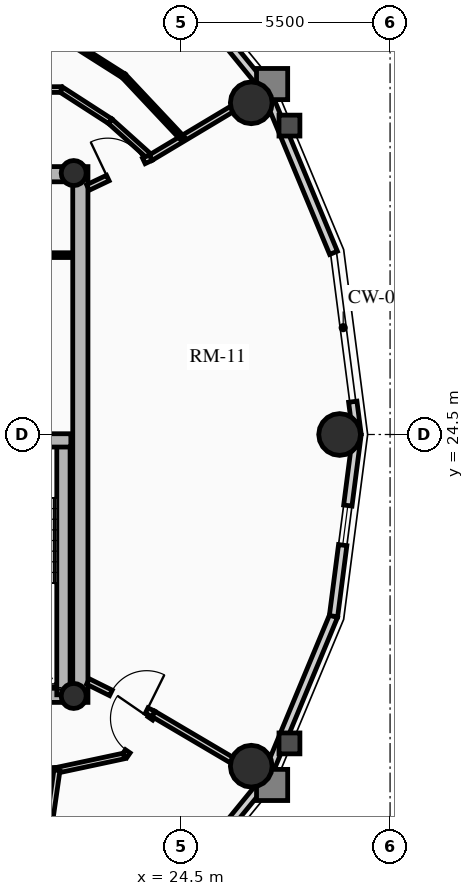
"""IFC4 building model, lengths in metres.
Left out: names, types, materials, properties, quantities, classifications, styles, units other than length and angle.
Written with IfcOpenShell. Run it as: python <this file> out.ifc"""

import sys

from ifc_helpers import new_model, si_unit, direction, frame, frame_2d, origin, origin_2d, place, context, subcontext, project, spatial, rectangle, circle, hollow_circle, extrude, source, transform, mapped, element, fill, save


model = new_model("IFC4")
c1 = context("Model", 3, precision=1e-05, world=origin(), true_north=direction((0.0, 1.0)))
c2 = subcontext(c1, "Body", "Model", "MODEL_VIEW")
j1 = project(units=[si_unit("LENGTHUNIT", "METRE"), si_unit("PLANEANGLEUNIT", "RADIAN")], contexts=[c1])
p1 = place(None, origin())
s1 = spatial("IfcSite", under=j1, at=p1, CompositionType="ELEMENT")
p2 = place(p1, origin())
s2 = spatial("IfcBuilding", under=s1, at=p2, CompositionType="ELEMENT")
p3 = place(p2, frame((0.0, 0.0, 219.94)))
s3 = spatial("IfcBuildingStorey", under=s2, at=p3, CompositionType="ELEMENT", Elevation=219.94)
p4 = place(p3, frame((21.85, 17.45, 0.0), z_axis=(0.0, 0.0, 1.0), x_axis=(0.0, 1.0, 0.0)))
e1 = element("IfcWall", 1, at=p4, inside=s3, PredefinedType="SHEAR", context=c2, shape_type="SweptSolid", body=[
    extrude(rectangle(XDim=14.1, YDim=0.4, at=frame_2d((7.05, 0.0))), origin(), (0.0, 0.0, 1.0), 2.91),
])
p5 = place(p3, frame((11.15, 17.65, 0.0), z_axis=(0.0, 0.0, 1.0), x_axis=(1.0, 0.0, 0.0)))
e2 = element("IfcWall", 2, at=p5, inside=s3, PredefinedType="SHEAR", context=c2, shape_type="SweptSolid", body=[
    extrude(rectangle(XDim=10.7, YDim=0.4, at=frame_2d((5.35, 0.0))), origin(), (0.0, 0.0, 1.0), 2.91),
])
m1 = source(origin(), c2, "Body", "SweptSolid", [
    extrude(rectangle(XDim=1.5, YDim=2.02, at=frame_2d((0.75, 1.01))), frame((0.0, 0.21, 0.0), z_axis=(0.0, -1.0, 0.0), x_axis=(1.0, 0.0, 0.0)), (0.0, 0.0, 1.0), 0.42),
])
p6 = place(p5, frame((5.45, 0.0, 0.0)))
e3 = element("IfcOpeningElement", 3, at=p6, cuts=e2, PredefinedType="OPENING", context=c2, shape_type="MappedRepresentation", body=[
    mapped(m1, transform((0.0, 0.0, 0.0), x_axis=(1.0, 0.0, 0.0), y_axis=(0.0, 1.0, 0.0), z_axis=(0.0, 0.0, 1.0), scale=1.0)),
])
p7 = place(p3, frame((11.15, 31.35, 0.0), z_axis=(0.0, 0.0, 1.0), x_axis=(1.0, 0.0, 0.0)))
e4 = element("IfcWall", 4, at=p7, inside=s3, PredefinedType="SHEAR", context=c2, shape_type="SweptSolid", body=[
    extrude(rectangle(XDim=10.7, YDim=0.4, at=frame_2d((5.35, 0.0))), origin(), (0.0, 0.0, 1.0), 2.91),
])
p8 = place(p7, frame((4.6, 0.0, 0.0)))
e5 = element("IfcOpeningElement", 5, at=p8, cuts=e4, PredefinedType="OPENING", context=c2, shape_type="MappedRepresentation", body=[
    mapped(m1, transform((0.0, 0.0, 0.0), x_axis=(1.0, 0.0, 0.0), y_axis=(0.0, 1.0, 0.0), z_axis=(0.0, 0.0, 1.0), scale=1.0)),
])
p9 = place(p3, frame((21.405, 17.65, 0.0), z_axis=(0.0, 0.0, 1.0), x_axis=(0.0, 1.0, 0.0)))
e6 = element("IfcWall", 6, at=p9, inside=s3, PredefinedType="SHEAR", context=c2, shape_type="SweptSolid", body=[
    extrude(rectangle(XDim=6.695, YDim=0.35, at=frame_2d((3.348, 0.0))), origin(), (0.0, 0.0, 1.0), 2.91),
])
p10 = place(p3, frame((18.315, 24.345, 0.0), z_axis=(0.0, 0.0, 1.0), x_axis=(1.0, 0.0, 0.0)))
e7 = element("IfcWall", 7, at=p10, inside=s3, PredefinedType="SHEAR", context=c2, shape_type="SweptSolid", body=[
    extrude(rectangle(XDim=3.285, YDim=0.35, at=frame_2d((1.643, 0.0))), origin(), (0.0, 0.0, 1.0), 2.91),
])
for number, where, z_axis, x_axis in (
    (8, (21.675, 17.62, 0.0), (0.0, 0.0, 1.0), (1.0, 0.0, 0.0)),
    (9, (21.675, 31.38, 0.0), (0.0, 0.0, 1.0), (1.0, 0.0, 0.0)),
):
    element("IfcColumn", number, at=place(p3, frame(where, z_axis=z_axis, x_axis=x_axis)), inside=s3, PredefinedType="COLUMN", context=c2, shape_type="SweptSolid", body=[
        extrude(hollow_circle(Radius=0.33, WallThickness=0.025, at=origin_2d()), origin(), (0.0, 0.0, 1.0), 2.91),
    ])
for number, where, z_axis, x_axis in (
    (10, (28.672, 24.5, 0.0), (0.0, 0.0, 1.0), (1.0, 0.0, 0.0)),
    (11, (26.347, 33.229, 0.0), (0.0, 0.0, 1.0), (1.0, 0.0, 0.0)),
    (12, (26.347, 15.771, 0.0), (0.0, 0.0, 1.0), (1.0, 0.0, 0.0)),
):
    element("IfcColumn", number, at=place(p3, frame(where, z_axis=z_axis, x_axis=x_axis)), inside=s3, PredefinedType="USERDEFINED", context=c2, shape_type="SweptSolid", body=[
        extrude(circle(Radius=0.55, at=origin_2d()), origin(), (0.0, 0.0, 1.0), 2.91),
    ])
p11 = place(p3, frame((29.018, 25.363, 0.0), z_axis=(0.0, 0.0, 1.0), x_axis=(0.128247365719, -0.991742211054, 0.0)))
e13 = element("IfcWall", 13, at=p11, inside=s3, PredefinedType="SOLIDWALL", context=c2, shape_type="SweptSolid", body=[
    extrude(rectangle(XDim=0.87, YDim=0.22, at=frame_2d((0.435, 0.0))), origin(), (0.0, 0.0, 1.0), 2.322),
])
p12 = place(p3, frame((26.718, 33.593, 0.0), z_axis=(0.0, 0.0, 1.0), x_axis=(0.384036305194, -0.923317993052, 0.0)))
e14 = element("IfcWall", 14, at=p12, inside=s3, PredefinedType="SOLIDWALL", context=c2, shape_type="SweptSolid", body=[
    extrude(rectangle(XDim=4.671, YDim=0.22, at=frame_2d((2.335, 0.0))), origin(), (0.0, 0.0, 1.0), 2.322),
])
p13 = place(p3, frame((23.924, 37.015, 0.0), z_axis=(0.0, 0.0, 1.0), x_axis=(0.632467166636, -0.774587169483, 0.0)))
e15 = element("IfcWall", 15, at=p13, inside=s3, PredefinedType="SOLIDWALL", context=c2, shape_type="SweptSolid", body=[
    extrude(rectangle(XDim=4.418, YDim=0.22, at=frame_2d((2.209, 0.0))), origin(), (0.0, 0.0, 1.0), 2.322),
])
m2 = source(origin(), c2, "Body", "SweptSolid", [
    extrude(rectangle(XDim=1.05, YDim=1.3, at=frame_2d((0.525, 0.65))), frame((0.0, 0.12, 0.0), z_axis=(0.0, -1.0, 0.0), x_axis=(1.0, 0.0, 0.0)), (0.0, 0.0, 1.0), 0.24),
])
p14 = place(p13, frame((1.684, 0.0, 0.65)))
e16 = element("IfcOpeningElement", 16, at=p14, cuts=e15, PredefinedType="OPENING", context=c2, shape_type="MappedRepresentation", body=[
    mapped(m2, transform((0.0, 0.0, 0.0), x_axis=(1.0, 0.0, 0.0), y_axis=(0.0, 1.0, 0.0), z_axis=(0.0, 0.0, 1.0), scale=1.0)),
])
p15 = place(p3, frame((26.718, 15.407, 0.0), z_axis=(0.0, 0.0, 1.0), x_axis=(-0.632467166636, -0.774587169483, 0.0)))
e17 = element("IfcWall", 17, at=p15, inside=s3, PredefinedType="SOLIDWALL", context=c2, shape_type="SweptSolid", body=[
    extrude(rectangle(XDim=4.418, YDim=0.22, at=frame_2d((2.209, 0.0))), origin(), (0.0, 0.0, 1.0), 2.322),
])
p16 = place(p15, frame((1.684, 0.0, 0.65)))
e18 = element("IfcOpeningElement", 18, at=p16, cuts=e17, PredefinedType="OPENING", context=c2, shape_type="MappedRepresentation", body=[
    mapped(m2, transform((0.0, 0.0, 0.0), x_axis=(1.0, 0.0, 0.0), y_axis=(0.0, 1.0, 0.0), z_axis=(0.0, 0.0, 1.0), scale=1.0)),
])
p17 = place(p3, frame((28.512, 19.719, 0.0), z_axis=(0.0, 0.0, 1.0), x_axis=(-0.384036305194, -0.923317993052, 0.0)))
e19 = element("IfcWall", 19, at=p17, inside=s3, PredefinedType="SOLIDWALL", context=c2, shape_type="SweptSolid", body=[
    extrude(rectangle(XDim=4.671, YDim=0.22, at=frame_2d((2.335, 0.0))), origin(), (0.0, 0.0, 1.0), 2.322),
])
p18 = place(p3, frame((29.13, 24.5, 0.0), z_axis=(0.0, 0.0, 1.0), x_axis=(-0.128241318541, -0.991742993027, 0.0)))
e20 = element("IfcWall", 20, at=p18, inside=s3, PredefinedType="SOLIDWALL", context=c2, shape_type="SweptSolid", body=[
    extrude(rectangle(XDim=4.82, YDim=0.22, at=frame_2d((2.41, 0.0))), origin(), (0.0, 0.0, 1.0), 2.322),
])
p19 = place(p18, frame((1.885, 0.0, 0.65)))
e21 = element("IfcOpeningElement", 21, at=p19, cuts=e20, PredefinedType="OPENING", context=c2, shape_type="MappedRepresentation", body=[
    mapped(m2, transform((0.0, 0.0, 0.0), x_axis=(1.0, 0.0, 0.0), y_axis=(0.0, 1.0, 0.0), z_axis=(0.0, 0.0, 1.0), scale=1.0)),
])
p20 = place(p3, frame((18.38, 29.22, 0.0), z_axis=(0.0, 0.0, 1.0), x_axis=(1.0, 0.0, 0.0)))
e22 = element("IfcWall", 22, at=p20, inside=s3, PredefinedType="PARTITIONING", context=c2, shape_type="SweptSolid", body=[
    extrude(rectangle(XDim=3.22, YDim=0.125, at=frame_2d((1.61, 0.0))), origin(), (0.0, 0.0, 1.0), 2.222),
])
p21 = place(p3, frame((23.701, 31.786, 0.0), z_axis=(0.0, 0.0, 1.0), x_axis=(-0.743742806382, 0.668465883913, 0.0)))
e23 = element("IfcWall", 23, at=p21, inside=s3, PredefinedType="PARTITIONING", context=c2, shape_type="SweptSolid", body=[
    extrude(rectangle(XDim=1.434, YDim=0.15, at=frame_2d((0.717, 0.0))), origin(), (0.0, 0.0, 1.0), 2.322),
])
p22 = place(p3, frame((22.635, 32.744, 0.0), z_axis=(0.0, 0.0, 1.0), x_axis=(-0.840119270642, 0.542401706391, 0.0)))
e24 = element("IfcWall", 24, at=p22, inside=s3, PredefinedType="PARTITIONING", context=c2, shape_type="SweptSolid", body=[
    extrude(rectangle(XDim=1.538, YDim=0.15, at=frame_2d((0.769, 0.0))), origin(), (0.0, 0.0, 1.0), 2.255),
])
p23 = place(p3, frame((21.344, 33.578, 0.0), z_axis=(0.0, 0.0, 1.0), x_axis=(-0.999984243152, -0.005613684, 0.0)))
e25 = element("IfcWall", 25, at=p23, inside=s3, PredefinedType="PARTITIONING", context=c2, shape_type="SweptSolid", body=[
    extrude(rectangle(XDim=3.262, YDim=0.15, at=frame_2d((1.631, 0.0))), origin(), (0.0, 0.0, 1.0), 2.322),
])
m3 = source(origin(), c2, "Body", "SweptSolid", [
    extrude(rectangle(XDim=1.05, YDim=2.015, at=frame_2d((0.525, 1.007))), frame((0.0, 0.085, 0.0), z_axis=(0.0, -1.0, 0.0), x_axis=(1.0, 0.0, 0.0)), (0.0, 0.0, 1.0), 0.17),
])
p24 = place(p23, frame((1.599, 0.0, 0.0)))
e26 = element("IfcOpeningElement", 26, at=p24, cuts=e25, PredefinedType="OPENING", context=c2, shape_type="MappedRepresentation", body=[
    mapped(m3, transform((0.0, 0.0, 0.0), x_axis=(1.0, 0.0, 0.0), y_axis=(0.0, 1.0, 0.0), z_axis=(0.0, 0.0, 1.0), scale=1.0)),
])
p25 = place(p3, frame((14.845, 15.441, 0.0), z_axis=(0.0, 0.0, 1.0), x_axis=(0.99938794868, 0.034981824334, 0.0)))
e27 = element("IfcWall", 27, at=p25, inside=s3, PredefinedType="PARTITIONING", context=c2, shape_type="SweptSolid", body=[
    extrude(rectangle(XDim=6.393, YDim=0.15, at=frame_2d((3.196, 0.0))), origin(), (0.0, 0.0, 1.0), 2.255),
])
p26 = place(p3, frame((21.234, 15.664, 0.0), z_axis=(0.0, 0.0, 1.0), x_axis=(0.977931581182, 0.208925399431, 0.0)))
e28 = element("IfcWall", 28, at=p26, inside=s3, PredefinedType="PARTITIONING", context=c2, shape_type="SweptSolid", body=[
    extrude(rectangle(XDim=1.823, YDim=0.15, at=frame_2d((0.912, 0.0))), origin(), (0.0, 0.0, 1.0), 2.255),
])
p27 = place(p3, frame((23.017, 16.045, 0.0), z_axis=(0.0, 0.0, 1.0), x_axis=(0.566660656138, 0.823951273308, 0.0)))
e29 = element("IfcWall", 29, at=p27, inside=s3, PredefinedType="PARTITIONING", context=c2, shape_type="SweptSolid", body=[
    extrude(rectangle(XDim=1.336, YDim=0.15, at=frame_2d((0.668, 0.0))), origin(), (0.0, 0.0, 1.0), 2.322),
])
p28 = place(p27, frame((0.143, 0.0, 0.0)))
e30 = element("IfcOpeningElement", 30, at=p28, cuts=e29, PredefinedType="OPENING", context=c2, shape_type="MappedRepresentation", body=[
    mapped(m3, transform((0.0, 0.0, 0.0), x_axis=(1.0, 0.0, 0.0), y_axis=(0.0, 1.0, 0.0), z_axis=(0.0, 0.0, 1.0), scale=1.0)),
])
p29 = place(p3, frame((23.701, 31.786, 0.0), z_axis=(0.0, 0.0, 1.0), x_axis=(0.858059206709, 0.513550774298, 0.0)))
e31 = element("IfcWall", 31, at=p29, inside=s3, PredefinedType="PARTITIONING", context=c2, shape_type="SweptSolid", body=[
    extrude(rectangle(XDim=3.497, YDim=0.16, at=frame_2d((1.748, 0.0))), origin(), (0.0, 0.0, 1.0), 2.322),
])
p30 = place(p3, frame((21.234, 15.664, 0.0), z_axis=(0.0, 0.0, 1.0), x_axis=(-0.141467563045, -0.989942891588, 0.0)))
e32 = element("IfcWall", 32, at=p30, inside=s3, PredefinedType="PARTITIONING", context=c2, shape_type="SweptSolid", body=[
    extrude(rectangle(XDim=5.918, YDim=0.16, at=frame_2d((2.959, 0.0))), origin(), (0.0, 0.0, 1.0), 2.322),
])
p31 = place(p3, frame((23.774, 17.146, 0.0), z_axis=(0.0, 0.0, 1.0), x_axis=(0.861296601099, -0.508102514198, 0.0)))
e33 = element("IfcWall", 33, at=p31, inside=s3, PredefinedType="PARTITIONING", context=c2, shape_type="SweptSolid", body=[
    extrude(rectangle(XDim=3.399, YDim=0.16, at=frame_2d((1.7, 0.0))), origin(), (0.0, 0.0, 1.0), 2.322),
])
p32 = place(p3, frame((22.05, 31.0, 0.0), z_axis=(0.0, 0.0, 1.0), x_axis=(0.903013459407, 0.429612257891, 0.0)))
e34 = element("IfcWall", 34, at=p32, inside=s3, PredefinedType="PARTITIONING", context=c2, shape_type="SweptSolid", body=[
    extrude(rectangle(XDim=1.829, YDim=0.16, at=frame_2d((0.914, 0.0))), origin(), (0.0, 0.0, 1.0), 2.255),
])
m4 = source(origin(), c2, "Body", "SweptSolid", [
    extrude(rectangle(XDim=1.05, YDim=2.015, at=frame_2d((0.525, 1.007))), frame((0.0, 0.09, 0.0), z_axis=(0.0, -1.0, 0.0), x_axis=(1.0, 0.0, 0.0)), (0.0, 0.0, 1.0), 0.18),
])
p33 = place(p32, frame((0.579, 0.0, 0.0)))
e35 = element("IfcOpeningElement", 35, at=p33, cuts=e34, PredefinedType="OPENING", context=c2, shape_type="MappedRepresentation", body=[
    mapped(m4, transform((0.0, 0.0, 0.0), x_axis=(1.0, 0.0, 0.0), y_axis=(0.0, 1.0, 0.0), z_axis=(0.0, 0.0, 1.0), scale=1.0)),
])
p34 = place(p3, frame((22.05, 18.0, 0.0), z_axis=(0.0, 0.0, 1.0), x_axis=(0.896045848613, -0.443961526692, 0.0)))
e36 = element("IfcWall", 36, at=p34, inside=s3, PredefinedType="PARTITIONING", context=c2, shape_type="SweptSolid", body=[
    extrude(rectangle(XDim=1.924, YDim=0.16, at=frame_2d((0.962, 0.0))), origin(), (0.0, 0.0, 1.0), 2.255),
])
p35 = place(p34, frame((0.674, 0.0, 0.0)))
e37 = element("IfcOpeningElement", 37, at=p35, cuts=e36, PredefinedType="OPENING", context=c2, shape_type="MappedRepresentation", body=[
    mapped(m4, transform((0.0, 0.0, 0.0), x_axis=(1.0, 0.0, 0.0), y_axis=(0.0, 1.0, 0.0), z_axis=(0.0, 0.0, 1.0), scale=1.0)),
])
p36 = place(p3, frame((24.542, 32.288, 0.0), z_axis=(0.0, 0.0, 1.0), x_axis=(-0.68501091047, 0.72853280814, 0.0)))
e38 = element("IfcWall", 38, at=p36, inside=s3, PredefinedType="PARTITIONING", context=c2, shape_type="SweptSolid", body=[
    extrude(rectangle(XDim=2.261, YDim=0.125, at=frame_2d((1.13, 0.0))), origin(), (0.0, 0.0, 1.0), 2.322),
])
p37 = place(p3, frame((22.993, 33.935, 0.0), z_axis=(0.0, 0.0, 1.0), x_axis=(-0.844312558894, 0.535851008112, 0.0)))
e39 = element("IfcWall", 39, at=p37, inside=s3, PredefinedType="PARTITIONING", context=c2, shape_type="SweptSolid", body=[
    extrude(rectangle(XDim=2.268, YDim=0.125, at=frame_2d((1.134, 0.0))), origin(), (0.0, 0.0, 1.0), 2.255),
])
m5 = source(origin(), c2, "Body", "SweptSolid", [
    extrude(rectangle(XDim=1.05, YDim=1.3, at=frame_2d((0.525, 0.65))), frame((0.0, 0.03, 0.0), z_axis=(0.0, -1.0, 0.0), x_axis=(1.0, 0.0, 0.0)), (0.0, 0.0, 1.0), 0.06),
])
p38 = place(p19, origin())
e40 = element("IfcWindow", 40, at=p38, inside=s3, PartitioningType="SINGLE_PANEL", PredefinedType="WINDOW", context=c2, shape_type="MappedRepresentation", body=[
    mapped(m5, transform((0.0, 0.0, 0.0), x_axis=(1.0, 0.0, 0.0), y_axis=(0.0, 1.0, 0.0), z_axis=(0.0, 0.0, 1.0), scale=1.0)),
])
fill(e21, e40)
m6 = source(origin(), c2, "Body", "SweptSolid", [
    extrude(rectangle(XDim=1.05, YDim=2.015, at=frame_2d((0.525, 1.007))), frame((0.0, 0.025, 0.0), z_axis=(0.0, -1.0, 0.0), x_axis=(1.0, 0.0, 0.0)), (0.0, 0.0, 1.0), 0.05),
])
p39 = place(p33, origin())
e41 = element("IfcDoor", 41, at=p39, inside=s3, OperationType="SINGLE_SWING_LEFT", PredefinedType="DOOR", context=c2, shape_type="MappedRepresentation", body=[
    mapped(m6, transform((0.0, 0.0, 0.0), x_axis=(1.0, 0.0, 0.0), y_axis=(0.0, 1.0, 0.0), z_axis=(0.0, 0.0, 1.0), scale=1.0)),
])
fill(e35, e41)
p40 = place(p35, origin())
e42 = element("IfcDoor", 42, at=p40, inside=s3, OperationType="SINGLE_SWING_RIGHT", PredefinedType="DOOR", context=c2, shape_type="MappedRepresentation", body=[
    mapped(m6, transform((0.0, 0.0, 0.0), x_axis=(1.0, 0.0, 0.0), y_axis=(0.0, 1.0, 0.0), z_axis=(0.0, 0.0, 1.0), scale=1.0)),
])
fill(e37, e42)
p41 = place(p28, origin())
e43 = element("IfcDoor", 43, at=p41, inside=s3, OperationType="SINGLE_SWING_RIGHT", PredefinedType="DOOR", context=c2, shape_type="MappedRepresentation", body=[
    mapped(m6, transform((0.0, 0.0, 0.0), x_axis=(1.0, 0.0, 0.0), y_axis=(0.0, 1.0, 0.0), z_axis=(0.0, 0.0, 1.0), scale=1.0)),
])
fill(e30, e43)
save(model, sys.argv[1])
